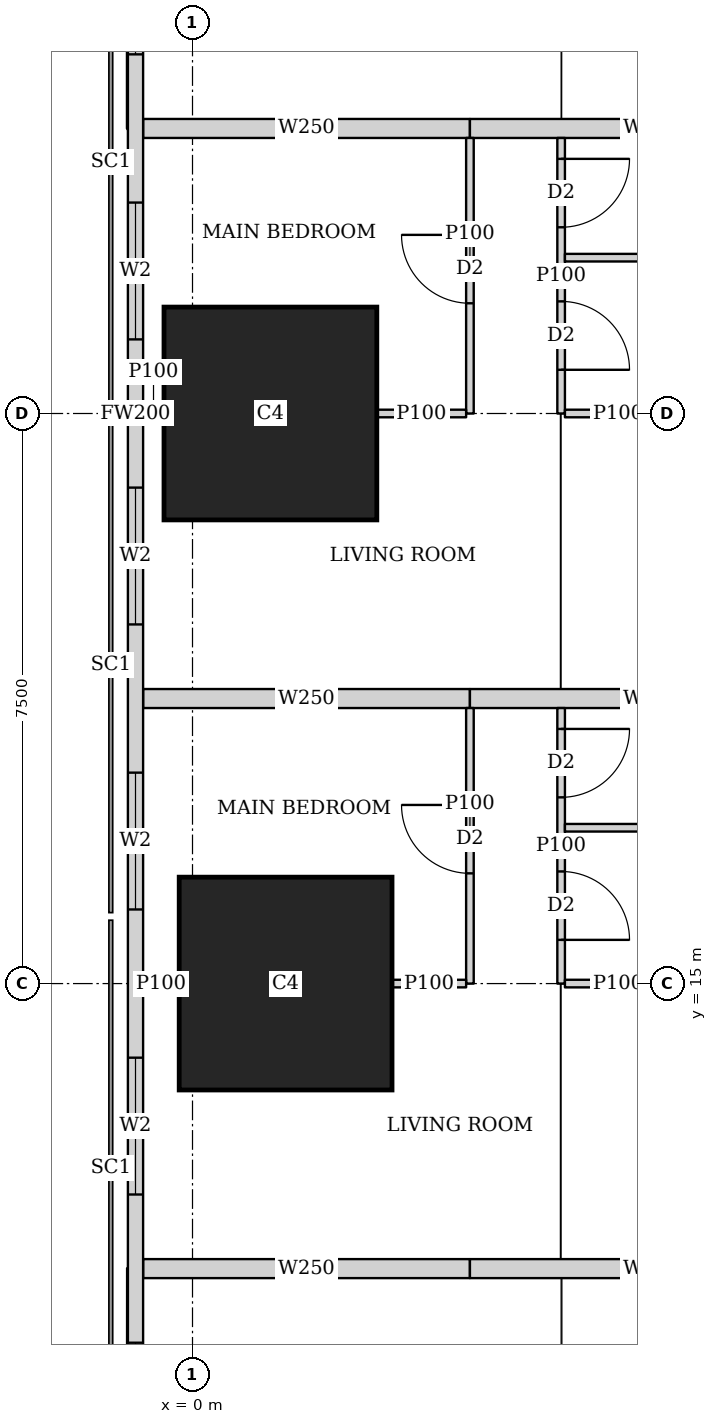
"""IFC4 building model, lengths in metres.
Left out: names, types, materials, properties, quantities, classifications, styles, units other than length and angle.
Written with IfcOpenShell. Run it as: python <this file> out.ifc"""

import sys

from ifc_helpers import new_model, si_unit, direction, frame, frame_2d, origin, origin_2d, place, context, subcontext, project, spatial, rectangle, extrude, element, fill, save


model = new_model("IFC4")
c1 = context("Model", 3, precision=1e-05, world=origin(), true_north=direction((0.0, 1.0)))
c2 = subcontext(c1, "Body", "Model", "MODEL_VIEW")
j1 = project(units=[si_unit("LENGTHUNIT", "METRE"), si_unit("PLANEANGLEUNIT", "RADIAN")], contexts=[c1])
p1 = place(None, origin())
s1 = spatial("IfcSite", under=j1, at=p1, CompositionType="ELEMENT")
p2 = place(p1, origin())
s2 = spatial("IfcBuilding", under=s1, at=p2, CompositionType="ELEMENT")
p3 = place(p2, frame((0.0, 0.0, 68.75)))
s3 = spatial("IfcBuildingStorey", under=s2, at=p3, CompositionType="ELEMENT", Elevation=68.75)
for number, where, z_axis, x_axis in (
    (1, (1.225, 15.0, 0.0), (0.0, 0.0, 1.0), (1.0, 0.0, 0.0)),
    (2, (1.025, 22.5, 0.0), (0.0, 0.0, 1.0), (1.0, 0.0, 0.0)),
):
    element("IfcColumn", number, at=place(p3, frame(where, z_axis=z_axis, x_axis=x_axis)), inside=s3, PredefinedType="COLUMN", context=c2, shape_type="SweptSolid", body=[
        extrude(rectangle(XDim=2.8, YDim=2.8, at=origin_2d()), origin(), (0.0, 0.0, 1.0), 3.75),
    ])
p4 = place(p3, frame((-0.75, 42.837, 0.0), z_axis=(0.0, 0.0, 1.0), x_axis=(0.0, -1.0, 0.0)))
e3 = element("IfcWall", 3, at=p4, inside=s3, PredefinedType="SOLIDWALL", context=c2, shape_type="SweptSolid", body=[
    extrude(rectangle(XDim=40.674, YDim=0.2, at=frame_2d((20.337, 0.0))), origin(), (0.0, 0.0, 1.0), 3.45),
])
p5 = place(p4, frame((1.78, 0.0, 0.9)))
e4 = element("IfcOpeningElement", 4, at=p5, cuts=e3, PredefinedType="OPENING", context=c2, shape_type="SweptSolid", body=[
    extrude(rectangle(XDim=1.8, YDim=1.5, at=frame_2d((0.9, 0.75))), frame((0.0, 0.11, 0.0), z_axis=(0.0, -1.0, 0.0), x_axis=(1.0, 0.0, 0.0)), (0.0, 0.0, 1.0), 0.22),
])
p6 = place(p4, frame((6.312, 0.0, 0.9)))
e5 = element("IfcOpeningElement", 5, at=p6, cuts=e3, PredefinedType="OPENING", context=c2, shape_type="SweptSolid", body=[
    extrude(rectangle(XDim=1.8, YDim=1.5, at=frame_2d((0.9, 0.75))), frame((0.0, 0.11, 0.0), z_axis=(0.0, -1.0, 0.0), x_axis=(1.0, 0.0, 0.0)), (0.0, 0.0, 1.0), 0.22),
])
p7 = place(p4, frame((10.062, 0.0, 0.9)))
e6 = element("IfcOpeningElement", 6, at=p7, cuts=e3, PredefinedType="OPENING", context=c2, shape_type="SweptSolid", body=[
    extrude(rectangle(XDim=1.8, YDim=1.5, at=frame_2d((0.9, 0.75))), frame((0.0, 0.11, 0.0), z_axis=(0.0, -1.0, 0.0), x_axis=(1.0, 0.0, 0.0)), (0.0, 0.0, 1.0), 0.22),
])
p8 = place(p4, frame((13.812, 0.0, 0.9)))
e7 = element("IfcOpeningElement", 7, at=p8, cuts=e3, PredefinedType="OPENING", context=c2, shape_type="SweptSolid", body=[
    extrude(rectangle(XDim=1.8, YDim=1.5, at=frame_2d((0.9, 0.75))), frame((0.0, 0.11, 0.0), z_axis=(0.0, -1.0, 0.0), x_axis=(1.0, 0.0, 0.0)), (0.0, 0.0, 1.0), 0.22),
])
p9 = place(p4, frame((17.562, 0.0, 0.9)))
e8 = element("IfcOpeningElement", 8, at=p9, cuts=e3, PredefinedType="OPENING", context=c2, shape_type="SweptSolid", body=[
    extrude(rectangle(XDim=1.8, YDim=1.5, at=frame_2d((0.9, 0.75))), frame((0.0, 0.11, 0.0), z_axis=(0.0, -1.0, 0.0), x_axis=(1.0, 0.0, 0.0)), (0.0, 0.0, 1.0), 0.22),
])
p10 = place(p4, frame((21.312, 0.0, 0.9)))
e9 = element("IfcOpeningElement", 9, at=p10, cuts=e3, PredefinedType="OPENING", context=c2, shape_type="SweptSolid", body=[
    extrude(rectangle(XDim=1.8, YDim=1.5, at=frame_2d((0.9, 0.75))), frame((0.0, 0.11, 0.0), z_axis=(0.0, -1.0, 0.0), x_axis=(1.0, 0.0, 0.0)), (0.0, 0.0, 1.0), 0.22),
])
p11 = place(p4, frame((25.062, 0.0, 0.9)))
e10 = element("IfcOpeningElement", 10, at=p11, cuts=e3, PredefinedType="OPENING", context=c2, shape_type="SweptSolid", body=[
    extrude(rectangle(XDim=1.8, YDim=1.5, at=frame_2d((0.9, 0.75))), frame((0.0, 0.11, 0.0), z_axis=(0.0, -1.0, 0.0), x_axis=(1.0, 0.0, 0.0)), (0.0, 0.0, 1.0), 0.22),
])
p12 = place(p4, frame((28.812, 0.0, 0.9)))
e11 = element("IfcOpeningElement", 11, at=p12, cuts=e3, PredefinedType="OPENING", context=c2, shape_type="SweptSolid", body=[
    extrude(rectangle(XDim=1.8, YDim=1.5, at=frame_2d((0.9, 0.75))), frame((0.0, 0.11, 0.0), z_axis=(0.0, -1.0, 0.0), x_axis=(1.0, 0.0, 0.0)), (0.0, 0.0, 1.0), 0.22),
])
p13 = place(p4, frame((32.562, 0.0, 0.9)))
e12 = element("IfcOpeningElement", 12, at=p13, cuts=e3, PredefinedType="OPENING", context=c2, shape_type="SweptSolid", body=[
    extrude(rectangle(XDim=1.8, YDim=1.5, at=frame_2d((0.9, 0.75))), frame((0.0, 0.11, 0.0), z_axis=(0.0, -1.0, 0.0), x_axis=(1.0, 0.0, 0.0)), (0.0, 0.0, 1.0), 0.22),
])
p14 = place(p4, frame((37.094, 0.0, 0.9)))
e13 = element("IfcOpeningElement", 13, at=p14, cuts=e3, PredefinedType="OPENING", context=c2, shape_type="SweptSolid", body=[
    extrude(rectangle(XDim=1.8, YDim=1.5, at=frame_2d((0.9, 0.75))), frame((0.0, 0.11, 0.0), z_axis=(0.0, -1.0, 0.0), x_axis=(1.0, 0.0, 0.0)), (0.0, 0.0, 1.0), 0.22),
])
p15 = place(p3, frame((3.65, 15.0, 0.0), z_axis=(0.0, 0.0, 1.0), x_axis=(0.0, 1.0, 0.0)))
e14 = element("IfcWall", 14, at=p15, inside=s3, PredefinedType="PARTITIONING", context=c2, shape_type="SweptSolid", body=[
    extrude(rectangle(XDim=3.625, YDim=0.1, at=frame_2d((1.812, 0.0))), origin(), (0.0, 0.0, 1.0), 3.45),
])
p16 = place(p15, frame((1.45, 0.0, 0.0)))
e15 = element("IfcOpeningElement", 15, at=p16, cuts=e14, PredefinedType="OPENING", context=c2, shape_type="SweptSolid", body=[
    extrude(rectangle(XDim=0.9, YDim=2.1, at=frame_2d((0.45, 1.05))), frame((0.0, 0.06, 0.0), z_axis=(0.0, -1.0, 0.0), x_axis=(1.0, 0.0, 0.0)), (0.0, 0.0, 1.0), 0.12),
])
p17 = place(p3, frame((4.85, 15.0, 0.0), z_axis=(0.0, 0.0, 1.0), x_axis=(0.0, 1.0, 0.0)))
e16 = element("IfcWall", 16, at=p17, inside=s3, PredefinedType="PARTITIONING", context=c2, shape_type="SweptSolid", body=[
    extrude(rectangle(XDim=3.625, YDim=0.1, at=frame_2d((1.812, 0.0))), origin(), (0.0, 0.0, 1.0), 3.45),
])
p18 = place(p17, frame((0.575, 0.0, 0.0)))
e17 = element("IfcOpeningElement", 17, at=p18, cuts=e16, PredefinedType="OPENING", context=c2, shape_type="SweptSolid", body=[
    extrude(rectangle(XDim=0.9, YDim=2.1, at=frame_2d((0.45, 1.05))), frame((0.0, 0.06, 0.0), z_axis=(0.0, -1.0, 0.0), x_axis=(1.0, 0.0, 0.0)), (0.0, 0.0, 1.0), 0.12),
])
p19 = place(p17, frame((2.45, 0.0, 0.0)))
e18 = element("IfcOpeningElement", 18, at=p19, cuts=e16, PredefinedType="OPENING", context=c2, shape_type="SweptSolid", body=[
    extrude(rectangle(XDim=0.9, YDim=2.1, at=frame_2d((0.45, 1.05))), frame((0.0, 0.06, 0.0), z_axis=(0.0, -1.0, 0.0), x_axis=(1.0, 0.0, 0.0)), (0.0, 0.0, 1.0), 0.12),
])
p20 = place(p3, frame((-0.65, 15.0, 0.0), z_axis=(0.0, 0.0, 1.0), x_axis=(1.0, 0.0, 0.0)))
e19 = element("IfcWall", 19, at=p20, inside=s3, PredefinedType="PARTITIONING", context=c2, shape_type="SweptSolid", body=[
    extrude(rectangle(XDim=0.474, YDim=0.1, at=frame_2d((0.237, 0.0))), origin(), (0.0, 0.0, 1.0), 3.45),
])
p21 = place(p3, frame((2.626, 15.0, 0.0), z_axis=(0.0, 0.0, 1.0), x_axis=(1.0, 0.0, 0.0)))
e20 = element("IfcWall", 20, at=p21, inside=s3, PredefinedType="PARTITIONING", context=c2, shape_type="SweptSolid", body=[
    extrude(rectangle(XDim=0.974, YDim=0.1, at=frame_2d((0.487, 0.0))), origin(), (0.0, 0.0, 1.0), 3.45),
])
p22 = place(p3, frame((4.9, 15.0, 0.0), z_axis=(0.0, 0.0, 1.0), x_axis=(1.0, 0.0, 0.0)))
e21 = element("IfcWall", 21, at=p22, inside=s3, PredefinedType="PARTITIONING", context=c2, shape_type="SweptSolid", body=[
    extrude(rectangle(XDim=1.399, YDim=0.1, at=frame_2d((0.7, 0.0))), origin(), (0.0, 0.0, 1.0), 3.45),
])
p23 = place(p3, frame((4.9, 17.05, 0.0), z_axis=(0.0, 0.0, 1.0), x_axis=(1.0, 0.0, 0.0)))
e22 = element("IfcWall", 22, at=p23, inside=s3, PredefinedType="PARTITIONING", context=c2, shape_type="SweptSolid", body=[
    extrude(rectangle(XDim=3.525, YDim=0.1, at=frame_2d((1.763, 0.0))), origin(), (0.0, 0.0, 1.0), 3.45),
])
p24 = place(p3, frame((-0.65, 11.25, 0.0), z_axis=(0.0, 0.0, 1.0), x_axis=(1.0, 0.0, 0.0)))
e23 = element("IfcWall", 23, at=p24, inside=s3, PredefinedType="SOLIDWALL", context=c2, shape_type="SweptSolid", body=[
    extrude(rectangle(XDim=4.3, YDim=0.25, at=frame_2d((2.15, 0.0))), origin(), (0.0, 0.0, 1.0), 2.0),
])
p25 = place(p3, frame((3.65, 11.25, 0.0), z_axis=(0.0, 0.0, 1.0), x_axis=(1.0, 0.0, 0.0)))
e24 = element("IfcWall", 24, at=p25, inside=s3, PredefinedType="SOLIDWALL", context=c2, shape_type="SweptSolid", body=[
    extrude(rectangle(XDim=4.775, YDim=0.25, at=frame_2d((2.388, 0.0))), origin(), (0.0, 0.0, 1.0), 3.45),
])
p26 = place(p3, frame((3.65, 22.5, 0.0), z_axis=(0.0, 0.0, 1.0), x_axis=(0.0, 1.0, 0.0)))
e25 = element("IfcWall", 25, at=p26, inside=s3, PredefinedType="PARTITIONING", context=c2, shape_type="SweptSolid", body=[
    extrude(rectangle(XDim=3.625, YDim=0.1, at=frame_2d((1.812, 0.0))), origin(), (0.0, 0.0, 1.0), 3.45),
])
p27 = place(p26, frame((1.45, 0.0, 0.0)))
e26 = element("IfcOpeningElement", 26, at=p27, cuts=e25, PredefinedType="OPENING", context=c2, shape_type="SweptSolid", body=[
    extrude(rectangle(XDim=0.9, YDim=2.1, at=frame_2d((0.45, 1.05))), frame((0.0, 0.06, 0.0), z_axis=(0.0, -1.0, 0.0), x_axis=(1.0, 0.0, 0.0)), (0.0, 0.0, 1.0), 0.12),
])
p28 = place(p3, frame((4.85, 22.5, 0.0), z_axis=(0.0, 0.0, 1.0), x_axis=(0.0, 1.0, 0.0)))
e27 = element("IfcWall", 27, at=p28, inside=s3, PredefinedType="PARTITIONING", context=c2, shape_type="SweptSolid", body=[
    extrude(rectangle(XDim=3.625, YDim=0.1, at=frame_2d((1.812, 0.0))), origin(), (0.0, 0.0, 1.0), 3.45),
])
p29 = place(p28, frame((0.575, 0.0, 0.0)))
e28 = element("IfcOpeningElement", 28, at=p29, cuts=e27, PredefinedType="OPENING", context=c2, shape_type="SweptSolid", body=[
    extrude(rectangle(XDim=0.9, YDim=2.1, at=frame_2d((0.45, 1.05))), frame((0.0, 0.06, 0.0), z_axis=(0.0, -1.0, 0.0), x_axis=(1.0, 0.0, 0.0)), (0.0, 0.0, 1.0), 0.12),
])
p30 = place(p28, frame((2.45, 0.0, 0.0)))
e29 = element("IfcOpeningElement", 29, at=p30, cuts=e27, PredefinedType="OPENING", context=c2, shape_type="SweptSolid", body=[
    extrude(rectangle(XDim=0.9, YDim=2.1, at=frame_2d((0.45, 1.05))), frame((0.0, 0.06, 0.0), z_axis=(0.0, -1.0, 0.0), x_axis=(1.0, 0.0, 0.0)), (0.0, 0.0, 1.0), 0.12),
])
p31 = place(p3, frame((-0.65, 22.5, 0.0), z_axis=(0.0, 0.0, 1.0), x_axis=(1.0, 0.0, 0.0)))
e30 = element("IfcWall", 30, at=p31, inside=s3, PredefinedType="PARTITIONING", context=c2, shape_type="SweptSolid", body=[
    extrude(rectangle(XDim=0.274, YDim=0.1, at=frame_2d((0.137, 0.0))), origin(), (0.0, 0.0, 1.0), 3.45),
])
p32 = place(p3, frame((2.426, 22.5, 0.0), z_axis=(0.0, 0.0, 1.0), x_axis=(1.0, 0.0, 0.0)))
e31 = element("IfcWall", 31, at=p32, inside=s3, PredefinedType="PARTITIONING", context=c2, shape_type="SweptSolid", body=[
    extrude(rectangle(XDim=1.174, YDim=0.1, at=frame_2d((0.587, 0.0))), origin(), (0.0, 0.0, 1.0), 3.45),
])
p33 = place(p3, frame((4.9, 22.5, 0.0), z_axis=(0.0, 0.0, 1.0), x_axis=(1.0, 0.0, 0.0)))
e32 = element("IfcWall", 32, at=p33, inside=s3, PredefinedType="PARTITIONING", context=c2, shape_type="SweptSolid", body=[
    extrude(rectangle(XDim=1.399, YDim=0.1, at=frame_2d((0.7, 0.0))), origin(), (0.0, 0.0, 1.0), 3.45),
])
p34 = place(p3, frame((4.9, 24.55, 0.0), z_axis=(0.0, 0.0, 1.0), x_axis=(1.0, 0.0, 0.0)))
e33 = element("IfcWall", 33, at=p34, inside=s3, PredefinedType="PARTITIONING", context=c2, shape_type="SweptSolid", body=[
    extrude(rectangle(XDim=3.525, YDim=0.1, at=frame_2d((1.763, 0.0))), origin(), (0.0, 0.0, 1.0), 3.45),
])
p35 = place(p3, frame((-0.65, 18.75, 0.0), z_axis=(0.0, 0.0, 1.0), x_axis=(1.0, 0.0, 0.0)))
e34 = element("IfcWall", 34, at=p35, inside=s3, PredefinedType="SOLIDWALL", context=c2, shape_type="SweptSolid", body=[
    extrude(rectangle(XDim=4.3, YDim=0.25, at=frame_2d((2.15, 0.0))), origin(), (0.0, 0.0, 1.0), 2.0),
])
p36 = place(p3, frame((3.65, 18.75, 0.0), z_axis=(0.0, 0.0, 1.0), x_axis=(1.0, 0.0, 0.0)))
e35 = element("IfcWall", 35, at=p36, inside=s3, PredefinedType="SOLIDWALL", context=c2, shape_type="SweptSolid", body=[
    extrude(rectangle(XDim=4.775, YDim=0.25, at=frame_2d((2.388, 0.0))), origin(), (0.0, 0.0, 1.0), 3.45),
])
p37 = place(p3, frame((-0.65, 26.25, 0.0), z_axis=(0.0, 0.0, 1.0), x_axis=(1.0, 0.0, 0.0)))
e36 = element("IfcWall", 36, at=p37, inside=s3, PredefinedType="SOLIDWALL", context=c2, shape_type="SweptSolid", body=[
    extrude(rectangle(XDim=4.3, YDim=0.25, at=frame_2d((2.15, 0.0))), origin(), (0.0, 0.0, 1.0), 2.0),
])
p38 = place(p3, frame((3.65, 26.25, 0.0), z_axis=(0.0, 0.0, 1.0), x_axis=(1.0, 0.0, 0.0)))
e37 = element("IfcWall", 37, at=p38, inside=s3, PredefinedType="SOLIDWALL", context=c2, shape_type="SweptSolid", body=[
    extrude(rectangle(XDim=4.775, YDim=0.25, at=frame_2d((2.388, 0.0))), origin(), (0.0, 0.0, 1.0), 3.45),
])
p39 = place(p8, origin())
e38 = element("IfcWindow", 38, at=p39, inside=s3, PartitioningType="SINGLE_PANEL", PredefinedType="WINDOW", context=c2, shape_type="SweptSolid", body=[
    extrude(rectangle(XDim=1.8, YDim=1.5, at=frame_2d((0.9, 0.75))), frame((0.0, 0.03, 0.0), z_axis=(0.0, -1.0, 0.0), x_axis=(1.0, 0.0, 0.0)), (0.0, 0.0, 1.0), 0.06),
])
fill(e7, e38)
p40 = place(p9, origin())
e39 = element("IfcWindow", 39, at=p40, inside=s3, PartitioningType="SINGLE_PANEL", PredefinedType="WINDOW", context=c2, shape_type="SweptSolid", body=[
    extrude(rectangle(XDim=1.8, YDim=1.5, at=frame_2d((0.9, 0.75))), frame((0.0, 0.03, 0.0), z_axis=(0.0, -1.0, 0.0), x_axis=(1.0, 0.0, 0.0)), (0.0, 0.0, 1.0), 0.06),
])
fill(e8, e39)
p41 = place(p10, origin())
e40 = element("IfcWindow", 40, at=p41, inside=s3, PartitioningType="SINGLE_PANEL", PredefinedType="WINDOW", context=c2, shape_type="SweptSolid", body=[
    extrude(rectangle(XDim=1.8, YDim=1.5, at=frame_2d((0.9, 0.75))), frame((0.0, 0.03, 0.0), z_axis=(0.0, -1.0, 0.0), x_axis=(1.0, 0.0, 0.0)), (0.0, 0.0, 1.0), 0.06),
])
fill(e9, e40)
p42 = place(p11, origin())
e41 = element("IfcWindow", 41, at=p42, inside=s3, PartitioningType="SINGLE_PANEL", PredefinedType="WINDOW", context=c2, shape_type="SweptSolid", body=[
    extrude(rectangle(XDim=1.8, YDim=1.5, at=frame_2d((0.9, 0.75))), frame((0.0, 0.03, 0.0), z_axis=(0.0, -1.0, 0.0), x_axis=(1.0, 0.0, 0.0)), (0.0, 0.0, 1.0), 0.06),
])
fill(e10, e41)
p43 = place(p12, origin())
e42 = element("IfcWindow", 42, at=p43, inside=s3, PartitioningType="SINGLE_PANEL", PredefinedType="WINDOW", context=c2, shape_type="SweptSolid", body=[
    extrude(rectangle(XDim=1.8, YDim=1.5, at=frame_2d((0.9, 0.75))), frame((0.0, 0.03, 0.0), z_axis=(0.0, -1.0, 0.0), x_axis=(1.0, 0.0, 0.0)), (0.0, 0.0, 1.0), 0.06),
])
fill(e11, e42)
p44 = place(p13, origin())
e43 = element("IfcWindow", 43, at=p44, inside=s3, PartitioningType="SINGLE_PANEL", PredefinedType="WINDOW", context=c2, shape_type="SweptSolid", body=[
    extrude(rectangle(XDim=1.8, YDim=1.5, at=frame_2d((0.9, 0.75))), frame((0.0, 0.03, 0.0), z_axis=(0.0, -1.0, 0.0), x_axis=(1.0, 0.0, 0.0)), (0.0, 0.0, 1.0), 0.06),
])
fill(e12, e43)
p45 = place(p16, origin())
e44 = element("IfcDoor", 44, at=p45, inside=s3, OperationType="SINGLE_SWING_RIGHT", PredefinedType="DOOR", context=c2, shape_type="SweptSolid", body=[
    extrude(rectangle(XDim=0.9, YDim=2.1, at=frame_2d((0.45, 1.05))), frame((0.0, 0.025, 0.0), z_axis=(0.0, -1.0, 0.0), x_axis=(1.0, 0.0, 0.0)), (0.0, 0.0, 1.0), 0.05),
])
fill(e15, e44)
p46 = place(p18, origin())
e45 = element("IfcDoor", 45, at=p46, inside=s3, OperationType="SINGLE_SWING_RIGHT", PredefinedType="DOOR", context=c2, shape_type="SweptSolid", body=[
    extrude(rectangle(XDim=0.9, YDim=2.1, at=frame_2d((0.45, 1.05))), frame((0.0, 0.025, 0.0), z_axis=(0.0, -1.0, 0.0), x_axis=(1.0, 0.0, 0.0)), (0.0, 0.0, 1.0), 0.05),
])
fill(e17, e45)
p47 = place(p19, origin())
e46 = element("IfcDoor", 46, at=p47, inside=s3, OperationType="SINGLE_SWING_LEFT", PredefinedType="DOOR", context=c2, shape_type="SweptSolid", body=[
    extrude(rectangle(XDim=0.9, YDim=2.1, at=frame_2d((0.45, 1.05))), frame((0.0, 0.025, 0.0), z_axis=(0.0, -1.0, 0.0), x_axis=(1.0, 0.0, 0.0)), (0.0, 0.0, 1.0), 0.05),
])
fill(e18, e46)
p48 = place(p27, origin())
e47 = element("IfcDoor", 47, at=p48, inside=s3, OperationType="SINGLE_SWING_RIGHT", PredefinedType="DOOR", context=c2, shape_type="SweptSolid", body=[
    extrude(rectangle(XDim=0.9, YDim=2.1, at=frame_2d((0.45, 1.05))), frame((0.0, 0.025, 0.0), z_axis=(0.0, -1.0, 0.0), x_axis=(1.0, 0.0, 0.0)), (0.0, 0.0, 1.0), 0.05),
])
fill(e26, e47)
p49 = place(p29, origin())
e48 = element("IfcDoor", 48, at=p49, inside=s3, OperationType="SINGLE_SWING_RIGHT", PredefinedType="DOOR", context=c2, shape_type="SweptSolid", body=[
    extrude(rectangle(XDim=0.9, YDim=2.1, at=frame_2d((0.45, 1.05))), frame((0.0, 0.025, 0.0), z_axis=(0.0, -1.0, 0.0), x_axis=(1.0, 0.0, 0.0)), (0.0, 0.0, 1.0), 0.05),
])
fill(e28, e48)
p50 = place(p30, origin())
e49 = element("IfcDoor", 49, at=p50, inside=s3, OperationType="SINGLE_SWING_LEFT", PredefinedType="DOOR", context=c2, shape_type="SweptSolid", body=[
    extrude(rectangle(XDim=0.9, YDim=2.1, at=frame_2d((0.45, 1.05))), frame((0.0, 0.025, 0.0), z_axis=(0.0, -1.0, 0.0), x_axis=(1.0, 0.0, 0.0)), (0.0, 0.0, 1.0), 0.05),
])
fill(e29, e49)
save(model, sys.argv[1])
